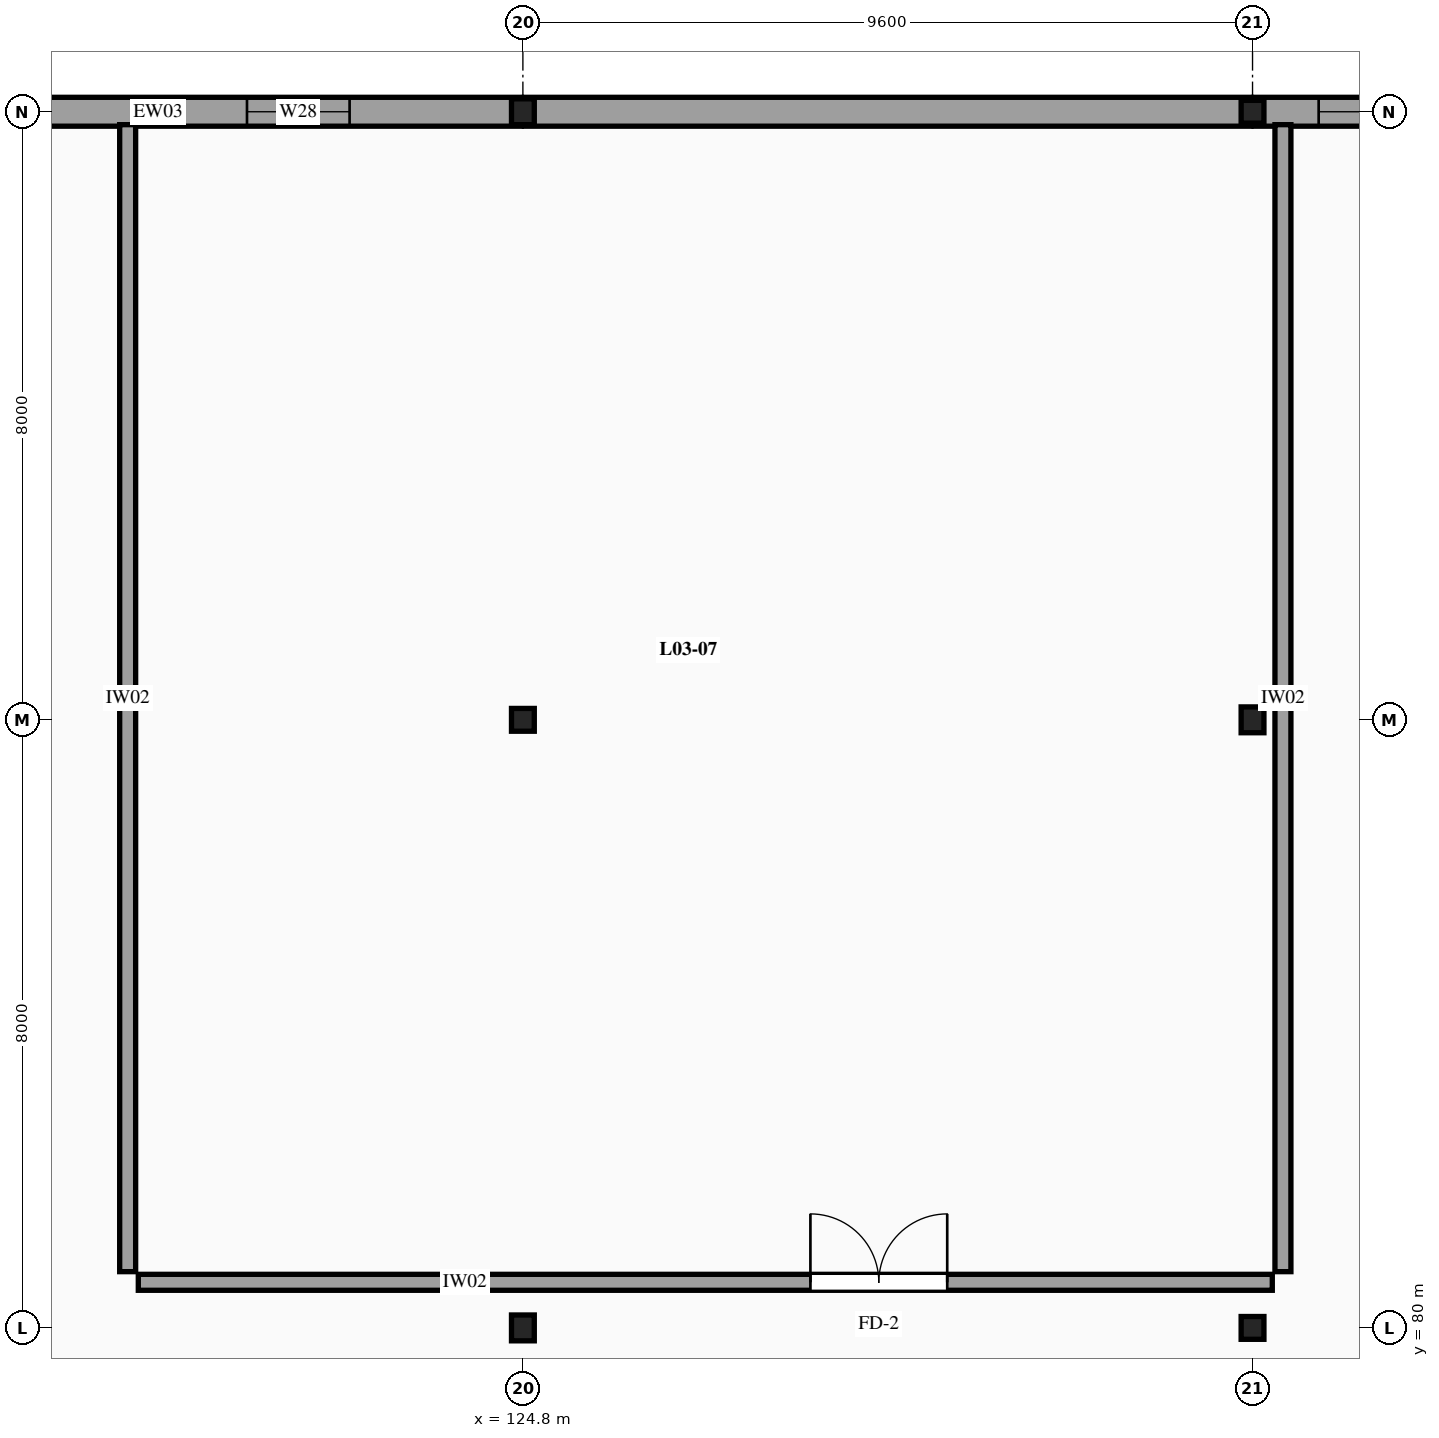
"""IFC4 building model, lengths in metres.
Left out: names, types, materials, properties, quantities, classifications, styles, units other than length and angle.
Written with IfcOpenShell. Run it as: python <this file> out.ifc"""

import sys

from ifc_helpers import new_model, si_unit, direction, frame, frame_2d, origin, origin_2d, place, context, subcontext, project, spatial, rectangle, i_section, extrude, element, fill, save


model = new_model("IFC4")
c1 = context("Model", 3, precision=1e-05, world=origin(), true_north=direction((0.0, 1.0)))
c2 = subcontext(c1, "Body", "Model", "MODEL_VIEW")
j1 = project(units=[si_unit("LENGTHUNIT", "METRE"), si_unit("PLANEANGLEUNIT", "RADIAN")], contexts=[c1])
p1 = place(None, origin())
s1 = spatial("IfcSite", under=j1, at=p1, CompositionType="ELEMENT")
p2 = place(p1, origin())
s2 = spatial("IfcBuilding", under=s1, at=p2, CompositionType="ELEMENT")
p3 = place(p2, frame((0.0, 0.0, 12.9)))
s3 = spatial("IfcBuildingStorey", under=s2, at=p3, CompositionType="ELEMENT", Elevation=12.9)
p4 = place(p3, frame((124.8, 80.0, -0.26), z_axis=(0.0, 0.0, 1.0), x_axis=(1.0, 0.0, 0.0)))
e1 = element("IfcColumn", 1, at=p4, inside=s3, PredefinedType="COLUMN", context=c2, shape_type="SweptSolid", body=[
    extrude(i_section(OverallWidth=0.3, OverallDepth=0.34, WebThickness=0.012, FlangeThickness=0.021, FilletRadius=0.027, at=origin_2d()), origin(), (0.0, 0.0, 1.0), 4.48),
])
p5 = place(p3, frame((124.8, 88.0, -0.26), z_axis=(0.0, 0.0, 1.0), x_axis=(1.0, 0.0, 0.0)))
e2 = element("IfcColumn", 2, at=p5, inside=s3, PredefinedType="COLUMN", context=c2, shape_type="SweptSolid", body=[
    extrude(i_section(OverallWidth=0.3, OverallDepth=0.3, WebThickness=0.011, FlangeThickness=0.019, FilletRadius=0.027, at=origin_2d()), origin(), (0.0, 0.0, 1.0), 4.48),
])
p6 = place(p3, frame((124.8, 96.0, -0.26), z_axis=(0.0, 0.0, 1.0), x_axis=(1.0, 0.0, 0.0)))
e3 = element("IfcColumn", 3, at=p6, inside=s3, PredefinedType="COLUMN", context=c2, shape_type="SweptSolid", body=[
    extrude(i_section(OverallWidth=0.3, OverallDepth=0.34, WebThickness=0.012, FlangeThickness=0.021, FilletRadius=0.027, at=origin_2d()), origin(), (0.0, 0.0, 1.0), 4.48),
])
p7 = place(p3, frame((134.4, 80.0, -0.26), z_axis=(0.0, 0.0, 1.0), x_axis=(1.0, 0.0, 0.0)))
e4 = element("IfcColumn", 4, at=p7, inside=s3, PredefinedType="COLUMN", context=c2, shape_type="SweptSolid", body=[
    extrude(i_section(OverallWidth=0.3, OverallDepth=0.3, WebThickness=0.011, FlangeThickness=0.019, FilletRadius=0.027, at=origin_2d()), origin(), (0.0, 0.0, 1.0), 4.48),
])
p8 = place(p3, frame((134.4, 88.0, -0.26), z_axis=(0.0, 0.0, 1.0), x_axis=(1.0, 0.0, 0.0)))
e5 = element("IfcColumn", 5, at=p8, inside=s3, PredefinedType="COLUMN", context=c2, shape_type="SweptSolid", body=[
    extrude(i_section(OverallWidth=0.3, OverallDepth=0.34, WebThickness=0.012, FlangeThickness=0.021, FilletRadius=0.027, at=origin_2d()), origin(), (0.0, 0.0, 1.0), 4.48),
])
p9 = place(p3, frame((134.4, 96.0, -0.26), z_axis=(0.0, 0.0, 1.0), x_axis=(1.0, 0.0, 0.0)))
e6 = element("IfcColumn", 6, at=p9, inside=s3, PredefinedType="COLUMN", context=c2, shape_type="SweptSolid", body=[
    extrude(i_section(OverallWidth=0.3, OverallDepth=0.3, WebThickness=0.011, FlangeThickness=0.019, FilletRadius=0.027, at=origin_2d()), origin(), (0.0, 0.0, 1.0), 4.48),
])
p10 = place(p3, frame((115.22, 96.0, 0.0), z_axis=(0.0, 0.0, 1.0), x_axis=(1.0, 0.0, 0.0)))
e7 = element("IfcWall", 7, at=p10, inside=s3, PredefinedType="SOLIDWALL", context=c2, shape_type="SweptSolid", body=[
    extrude(rectangle(XDim=9.56, YDim=0.38, at=frame_2d((4.78, 0.0))), origin(), (0.0, 0.0, 1.0), 3.54),
])
p11 = place(p10, frame((0.85, 0.0, 0.85)))
e8 = element("IfcOpeningElement", 8, at=p11, cuts=e7, PredefinedType="OPENING", context=c2, shape_type="SweptSolid", body=[
    extrude(rectangle(XDim=1.35, YDim=1.7, at=frame_2d((0.675, 0.85))), frame((0.0, 0.2, 0.0), z_axis=(0.0, -1.0, 0.0), x_axis=(1.0, 0.0, 0.0)), (0.0, 0.0, 1.0), 0.4),
])
p12 = place(p10, frame((5.95, 0.0, 0.85)))
e9 = element("IfcOpeningElement", 9, at=p12, cuts=e7, PredefinedType="OPENING", context=c2, shape_type="SweptSolid", body=[
    extrude(rectangle(XDim=1.35, YDim=1.7, at=frame_2d((0.675, 0.85))), frame((0.0, 0.2, 0.0), z_axis=(0.0, -1.0, 0.0), x_axis=(1.0, 0.0, 0.0)), (0.0, 0.0, 1.0), 0.4),
])
p13 = place(p3, frame((124.82, 96.0, 0.0), z_axis=(0.0, 0.0, 1.0), x_axis=(1.0, 0.0, 0.0)))
e10 = element("IfcWall", 10, at=p13, inside=s3, PredefinedType="SOLIDWALL", context=c2, shape_type="SweptSolid", body=[
    extrude(rectangle(XDim=9.56, YDim=0.38, at=frame_2d((4.78, 0.0))), origin(), (0.0, 0.0, 1.0), 3.54),
])
p14 = place(p3, frame((134.42, 96.0, 0.0), z_axis=(0.0, 0.0, 1.0), x_axis=(1.0, 0.0, 0.0)))
e11 = element("IfcWall", 11, at=p14, inside=s3, PredefinedType="SOLIDWALL", context=c2, shape_type="SweptSolid", body=[
    extrude(rectangle(XDim=9.56, YDim=0.38, at=frame_2d((4.78, 0.0))), origin(), (0.0, 0.0, 1.0), 3.54),
])
p15 = place(p14, frame((0.85, 0.0, 0.72)))
e12 = element("IfcOpeningElement", 12, at=p15, cuts=e11, PredefinedType="OPENING", context=c2, shape_type="SweptSolid", body=[
    extrude(rectangle(XDim=1.8, YDim=1.6, at=frame_2d((0.9, 0.8))), frame((0.0, 0.2, 0.0), z_axis=(0.0, -1.0, 0.0), x_axis=(1.0, 0.0, 0.0)), (0.0, 0.0, 1.0), 0.4),
])
p16 = place(p14, frame((5.95, 0.0, 0.72)))
e13 = element("IfcOpeningElement", 13, at=p16, cuts=e11, PredefinedType="OPENING", context=c2, shape_type="SweptSolid", body=[
    extrude(rectangle(XDim=1.8, YDim=1.6, at=frame_2d((0.9, 0.8))), frame((0.0, 0.2, 0.0), z_axis=(0.0, -1.0, 0.0), x_axis=(1.0, 0.0, 0.0)), (0.0, 0.0, 1.0), 0.4),
])
p17 = place(p3, frame((119.74, 80.6, 0.0), z_axis=(0.0, 0.0, 1.0), x_axis=(1.0, 0.0, 0.0)))
e14 = element("IfcWall", 14, at=p17, inside=s3, PredefinedType="SOLIDWALL", context=c2, shape_type="SweptSolid", body=[
    extrude(rectangle(XDim=14.92, YDim=0.21, at=frame_2d((7.46, 0.0))), origin(), (0.0, 0.0, 1.0), 3.38),
])
p18 = place(p17, frame((8.843, 0.0, 0.0)))
e15 = element("IfcOpeningElement", 15, at=p18, cuts=e14, PredefinedType="OPENING", context=c2, shape_type="SweptSolid", body=[
    extrude(rectangle(XDim=1.8, YDim=2.4, at=frame_2d((0.9, 1.2))), frame((0.0, 0.115, 0.0), z_axis=(0.0, -1.0, 0.0), x_axis=(1.0, 0.0, 0.0)), (0.0, 0.0, 1.0), 0.23),
])
for number, where, z_axis, x_axis in (
    (16, (119.6, 80.74, 0.0), (0.0, 0.0, 1.0), (0.0, 1.0, 0.0)),
    (17, (134.8, 80.74, 0.0), (0.0, 0.0, 1.0), (0.0, 1.0, 0.0)),
):
    element("IfcWall", number, at=place(p3, frame(where, z_axis=z_axis, x_axis=x_axis)), inside=s3, PredefinedType="SOLIDWALL", context=c2, shape_type="SweptSolid", body=[
        extrude(rectangle(XDim=15.09, YDim=0.21, at=frame_2d((7.545, 0.0))), origin(), (0.0, 0.0, 1.0), 3.38),
    ])
p19 = place(p12, origin())
e18 = element("IfcWindow", 18, at=p19, inside=s3, PartitioningType="SINGLE_PANEL", PredefinedType="WINDOW", context=c2, shape_type="SweptSolid", body=[
    extrude(rectangle(XDim=1.35, YDim=1.7, at=frame_2d((0.675, 0.85))), frame((0.0, 0.03, 0.0), z_axis=(0.0, -1.0, 0.0), x_axis=(1.0, 0.0, 0.0)), (0.0, 0.0, 1.0), 0.06),
])
fill(e9, e18)
p20 = place(p15, origin())
e19 = element("IfcWindow", 19, at=p20, inside=s3, PartitioningType="SINGLE_PANEL", PredefinedType="WINDOW", context=c2, shape_type="SweptSolid", body=[
    extrude(rectangle(XDim=1.8, YDim=1.6, at=frame_2d((0.9, 0.8))), frame((0.0, 0.03, 0.0), z_axis=(0.0, -1.0, 0.0), x_axis=(1.0, 0.0, 0.0)), (0.0, 0.0, 1.0), 0.06),
])
fill(e12, e19)
p21 = place(p18, origin())
e20 = element("IfcDoor", 20, at=p21, inside=s3, OperationType="DOUBLE_DOOR_SINGLE_SWING", PredefinedType="DOOR", context=c2, shape_type="SweptSolid", body=[
    extrude(rectangle(XDim=1.8, YDim=2.4, at=frame_2d((0.9, 1.2))), frame((0.0, 0.025, 0.0), z_axis=(0.0, -1.0, 0.0), x_axis=(1.0, 0.0, 0.0)), (0.0, 0.0, 1.0), 0.05),
])
fill(e15, e20)
save(model, sys.argv[1])
